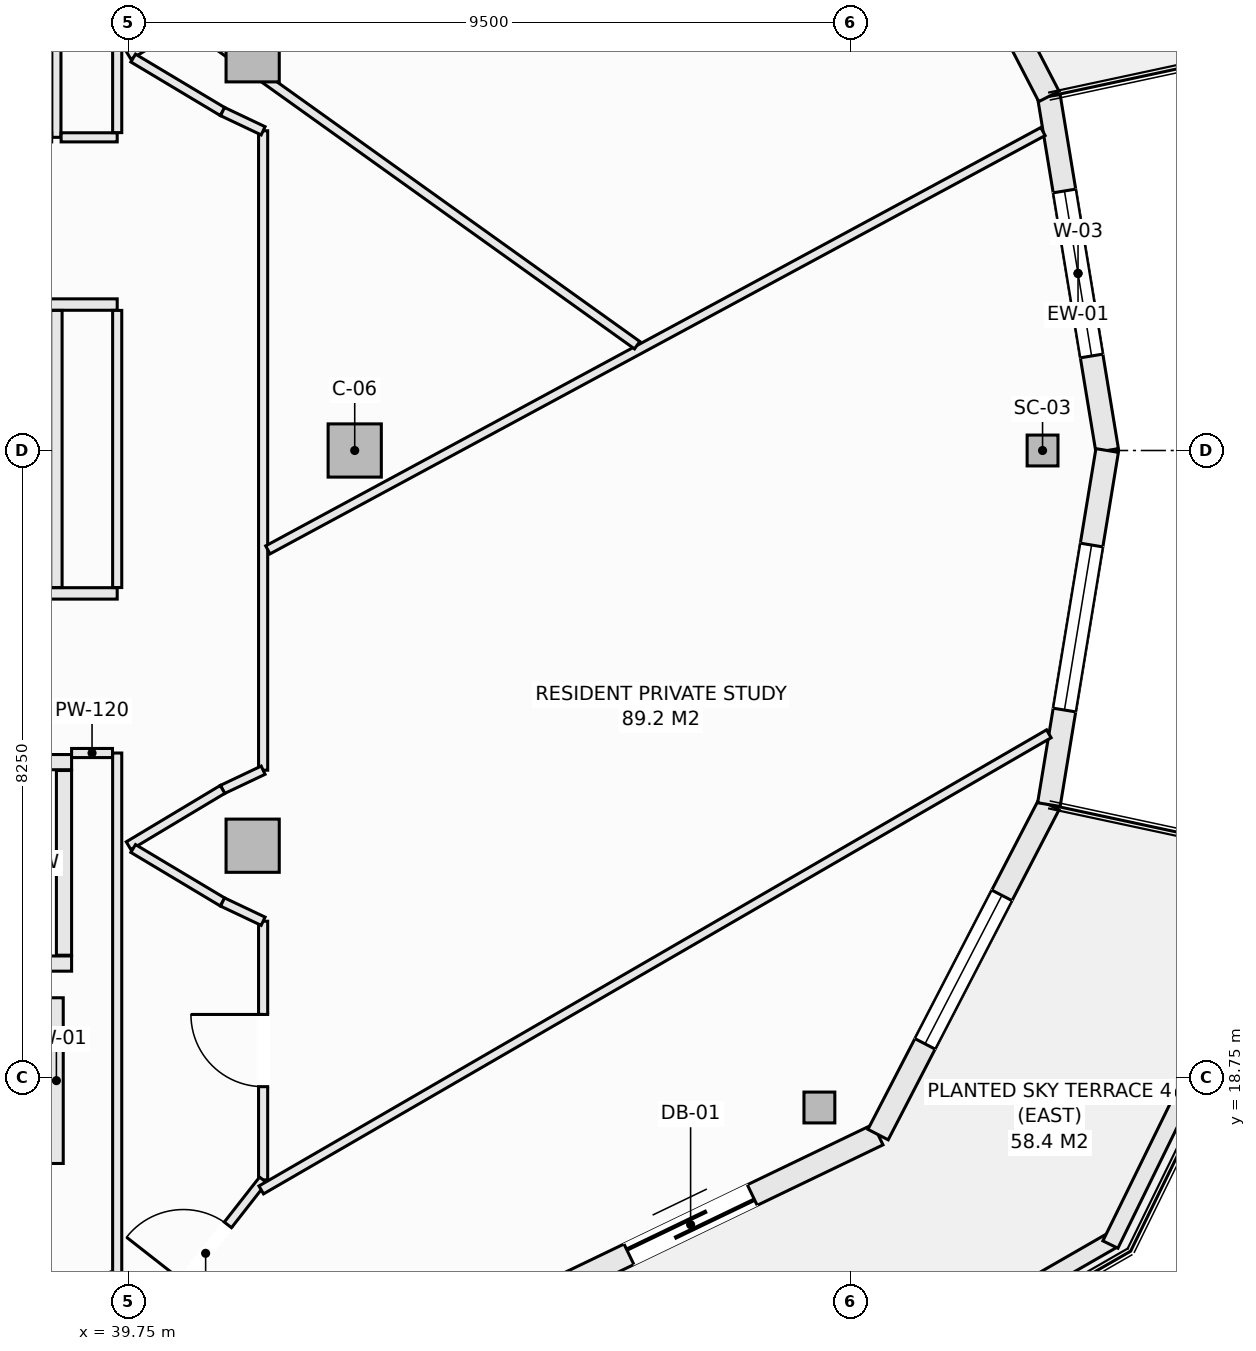
"""IFC4 building model, lengths in metres.
Left out: names, types, materials, properties, quantities, classifications, styles, units other than length and angle.
Written with IfcOpenShell. Run it as: python <this file> out.ifc"""

import sys

from ifc_helpers import new_model, si_unit, direction, frame, frame_2d, origin, origin_2d, place, context, subcontext, project, spatial, rectangle, hollow_rectangle, extrude, element, fill, save


model = new_model("IFC4")
c1 = context("Model", 3, precision=1e-05, world=origin(), true_north=direction((0.0, 1.0)))
c2 = subcontext(c1, "Body", "Model", "MODEL_VIEW")
j1 = project(units=[si_unit("LENGTHUNIT", "METRE"), si_unit("PLANEANGLEUNIT", "RADIAN")], contexts=[c1])
p1 = place(None, origin())
s1 = spatial("IfcSite", under=j1, at=p1, CompositionType="ELEMENT")
p2 = place(p1, origin())
s2 = spatial("IfcBuilding", under=s1, at=p2, CompositionType="ELEMENT")
p3 = place(p2, frame((0.0, 0.0, 252.5)))
s3 = spatial("IfcBuildingStorey", under=s2, at=p3, CompositionType="ELEMENT", Elevation=252.5)
for number, where, z_axis, x_axis in (
    (1, (51.775, 27.0, -0.27), (0.0, 0.0, 1.0), (1.0, 0.0, 0.0)),
    (2, (48.839, 18.356, -0.27), (0.0, 0.0, 1.0), (1.0, 0.0, 0.0)),
):
    element("IfcColumn", number, at=place(p3, frame(where, z_axis=z_axis, x_axis=x_axis)), inside=s3, PredefinedType="COLUMN", context=c2, shape_type="SweptSolid", body=[
        extrude(hollow_rectangle(XDim=0.406, YDim=0.406, WallThickness=0.016, at=origin_2d()), origin(), (0.0, 0.0, 1.0), 3.3),
    ])
for number, where, z_axis, x_axis in (
    (3, (42.725, 27.0, -0.27), (0.0, 0.0, 1.0), (1.0, 0.0, 0.0)),
    (4, (41.382, 32.199, -0.27), (0.0, 0.0, 1.0), (1.0, 0.0, 0.0)),
    (5, (41.382, 21.801, -0.27), (0.0, 0.0, 1.0), (1.0, 0.0, 0.0)),
):
    element("IfcColumn", number, at=place(p3, frame(where, z_axis=z_axis, x_axis=x_axis)), inside=s3, PredefinedType="COLUMN", context=c2, shape_type="SweptSolid", body=[
        extrude(rectangle(XDim=0.7, YDim=0.7, at=origin_2d()), origin(), (0.0, 0.0, 1.0), 3.3),
    ])
p4 = place(p3, frame((51.858, 31.659, 0.0), z_axis=(0.0, 0.0, 1.0), x_axis=(0.162369371657, -0.986730047758, 0.0)))
e6 = element("IfcWall", 6, at=p4, inside=s3, PredefinedType="SOLIDWALL", context=c2, shape_type="SweptSolid", body=[
    extrude(rectangle(XDim=4.721, YDim=0.3, at=frame_2d((2.361, 0.0))), origin(), (0.0, 0.0, 1.0), 2.605),
])
p5 = place(p4, frame((1.261, 0.0, 0.72)))
e7 = element("IfcOpeningElement", 7, at=p5, cuts=e6, PredefinedType="OPENING", context=c2, shape_type="SweptSolid", body=[
    extrude(rectangle(XDim=2.2, YDim=1.65, at=frame_2d((1.1, 0.825))), frame((0.0, 0.16, 0.0), z_axis=(0.0, -1.0, 0.0), x_axis=(1.0, 0.0, 0.0)), (0.0, 0.0, 1.0), 0.32),
])
p6 = place(p3, frame((49.611, 36.0, 0.0), z_axis=(0.0, 0.0, 1.0), x_axis=(0.459793771602, -0.888025724625, 0.0)))
e8 = element("IfcWall", 8, at=p6, inside=s3, PredefinedType="SOLIDWALL", context=c2, shape_type="SweptSolid", body=[
    extrude(rectangle(XDim=4.889, YDim=0.3, at=frame_2d((2.444, 0.0))), origin(), (0.0, 0.0, 1.0), 2.605),
])
p7 = place(p6, frame((1.344, 0.0, 0.72)))
e9 = element("IfcOpeningElement", 9, at=p7, cuts=e8, PredefinedType="OPENING", context=c2, shape_type="SweptSolid", body=[
    extrude(rectangle(XDim=2.2, YDim=1.65, at=frame_2d((1.1, 0.825))), frame((0.0, 0.16, 0.0), z_axis=(0.0, -1.0, 0.0), x_axis=(1.0, 0.0, 0.0)), (0.0, 0.0, 1.0), 0.32),
])
p8 = place(p3, frame((44.677, 15.63, 0.0), z_axis=(0.0, 0.0, 1.0), x_axis=(0.901355238351, 0.433080517106, 0.0)))
e10 = element("IfcWall", 10, at=p8, inside=s3, PredefinedType="SOLIDWALL", context=c2, shape_type="SweptSolid", body=[
    extrude(rectangle(XDim=5.473, YDim=0.3, at=frame_2d((2.737, 0.0))), origin(), (0.0, 0.0, 1.0), 2.605),
])
p9 = place(p8, frame((1.837, 0.0, 0.0)))
e11 = element("IfcOpeningElement", 11, at=p9, cuts=e10, PredefinedType="OPENING", context=c2, shape_type="SweptSolid", body=[
    extrude(rectangle(XDim=1.8, YDim=2.25, at=frame_2d((0.9, 1.125))), frame((0.0, 0.16, 0.0), z_axis=(0.0, -1.0, 0.0), x_axis=(1.0, 0.0, 0.0)), (0.0, 0.0, 1.0), 0.32),
])
p10 = place(p3, frame((49.611, 18.0, 0.0), z_axis=(0.0, 0.0, 1.0), x_axis=(0.459793771602, 0.888025724625, 0.0)))
e12 = element("IfcWall", 12, at=p10, inside=s3, PredefinedType="SOLIDWALL", context=c2, shape_type="SweptSolid", body=[
    extrude(rectangle(XDim=4.889, YDim=0.3, at=frame_2d((2.444, 0.0))), origin(), (0.0, 0.0, 1.0), 2.605),
])
p11 = place(p10, frame((1.344, 0.0, 0.72)))
e13 = element("IfcOpeningElement", 13, at=p11, cuts=e12, PredefinedType="OPENING", context=c2, shape_type="SweptSolid", body=[
    extrude(rectangle(XDim=2.2, YDim=1.65, at=frame_2d((1.1, 0.825))), frame((0.0, 0.16, 0.0), z_axis=(0.0, -1.0, 0.0), x_axis=(1.0, 0.0, 0.0)), (0.0, 0.0, 1.0), 0.32),
])
p12 = place(p3, frame((51.858, 22.341, 0.0), z_axis=(0.0, 0.0, 1.0), x_axis=(0.162369371657, 0.986730047758, 0.0)))
e14 = element("IfcWall", 14, at=p12, inside=s3, PredefinedType="SOLIDWALL", context=c2, shape_type="SweptSolid", body=[
    extrude(rectangle(XDim=4.721, YDim=0.3, at=frame_2d((2.361, 0.0))), origin(), (0.0, 0.0, 1.0), 2.605),
])
p13 = place(p12, frame((1.261, 0.0, 0.72)))
e15 = element("IfcOpeningElement", 15, at=p13, cuts=e14, PredefinedType="OPENING", context=c2, shape_type="SweptSolid", body=[
    extrude(rectangle(XDim=2.2, YDim=1.65, at=frame_2d((1.1, 0.825))), frame((0.0, 0.16, 0.0), z_axis=(0.0, -1.0, 0.0), x_axis=(1.0, 0.0, 0.0)), (0.0, 0.0, 1.0), 0.32),
])
p14 = place(p3, frame((47.321, 13.521, 0.0), z_axis=(0.0, 0.0, 1.0), x_axis=(0.866901621005, 0.49847926687, 0.0)))
e16 = element("IfcWall", 16, at=p14, inside=s3, PredefinedType="PARAPET", context=c2, shape_type="SweptSolid", body=[
    extrude(rectangle(XDim=6.197, YDim=0.22, at=frame_2d((3.098, 0.0))), origin(), (0.0, 0.0, 1.0), 0.52),
])
p15 = place(p3, frame((52.667, 16.553, 0.0), z_axis=(0.0, 0.0, 1.0), x_axis=(0.440058847499, 0.897968936399, 0.0)))
e17 = element("IfcWall", 17, at=p15, inside=s3, PredefinedType="PARAPET", context=c2, shape_type="SweptSolid", body=[
    extrude(rectangle(XDim=5.689, YDim=0.22, at=frame_2d((2.845, 0.0))), origin(), (0.0, 0.0, 1.0), 0.52),
])
p16 = place(p3, frame((36.75, 22.9, 0.0), z_axis=(0.0, 0.0, 1.0), x_axis=(1.0, 0.0, 0.0)))
e18 = element("IfcWall", 18, at=p16, inside=s3, PredefinedType="SOLIDWALL", context=c2, shape_type="SweptSolid", body=[
    extrude(rectangle(XDim=2.25, YDim=0.2, at=frame_2d((1.125, 0.0))), origin(), (0.0, 0.0, 1.0), 3.03),
])
p17 = place(p16, frame((0.575, 0.0, 0.0)))
e19 = element("IfcOpeningElement", 19, at=p17, cuts=e18, PredefinedType="OPENING", context=c2, shape_type="SweptSolid", body=[
    extrude(rectangle(XDim=1.1, YDim=2.2, at=frame_2d((0.55, 1.1))), frame((0.0, 0.11, 0.0), z_axis=(0.0, -1.0, 0.0), x_axis=(1.0, 0.0, 0.0)), (0.0, 0.0, 1.0), 0.22),
])
p18 = place(p3, frame((36.75, 20.25, 0.0), z_axis=(0.0, 0.0, 1.0), x_axis=(1.0, 0.0, 0.0)))
e20 = element("IfcWall", 20, at=p18, inside=s3, PredefinedType="SOLIDWALL", context=c2, shape_type="SweptSolid", body=[
    extrude(rectangle(XDim=2.25, YDim=0.2, at=frame_2d((1.125, 0.0))), origin(), (0.0, 0.0, 1.0), 3.03),
])
p19 = place(p3, frame((38.9, 20.36, 0.0), z_axis=(0.0, 0.0, 1.0), x_axis=(0.0, 1.0, 0.0)))
e21 = element("IfcWall", 21, at=p19, inside=s3, PredefinedType="SOLIDWALL", context=c2, shape_type="SweptSolid", body=[
    extrude(rectangle(XDim=2.43, YDim=0.2, at=frame_2d((1.215, 0.0))), origin(), (0.0, 0.0, 1.0), 3.03),
])
p20 = place(p3, frame((29.96, 25.12, 0.0), z_axis=(0.0, 0.0, 1.0), x_axis=(1.0, 0.0, 0.0)))
e22 = element("IfcWall", 22, at=p20, inside=s3, PredefinedType="PARTITIONING", context=c2, shape_type="SweptSolid", body=[
    extrude(rectangle(XDim=9.64, YDim=0.15, at=frame_2d((4.82, 0.0))), origin(), (0.0, 0.0, 1.0), 3.03),
])
p21 = place(p20, frame((3.05, 0.0, 0.0)))
e23 = element("IfcOpeningElement", 23, at=p21, cuts=e22, PredefinedType="OPENING", context=c2, shape_type="SweptSolid", body=[
    extrude(rectangle(XDim=0.95, YDim=2.1, at=frame_2d((0.475, 1.05))), frame((0.0, 0.085, 0.0), z_axis=(0.0, -1.0, 0.0), x_axis=(1.0, 0.0, 0.0)), (0.0, 0.0, 1.0), 0.17),
])
p22 = place(p20, frame((7.265, 0.0, 0.0)))
e24 = element("IfcOpeningElement", 24, at=p22, cuts=e22, PredefinedType="OPENING", context=c2, shape_type="SweptSolid", body=[
    extrude(rectangle(XDim=0.95, YDim=2.1, at=frame_2d((0.475, 1.05))), frame((0.0, 0.085, 0.0), z_axis=(0.0, -1.0, 0.0), x_axis=(1.0, 0.0, 0.0)), (0.0, 0.0, 1.0), 0.17),
])
p23 = place(p3, frame((30.077, 28.92, 0.0), z_axis=(0.0, 0.0, 1.0), x_axis=(1.0, 0.0, 0.0)))
e25 = element("IfcWall", 25, at=p23, inside=s3, PredefinedType="PARTITIONING", context=c2, shape_type="SweptSolid", body=[
    extrude(rectangle(XDim=9.523, YDim=0.15, at=frame_2d((4.762, 0.0))), origin(), (0.0, 0.0, 1.0), 3.03),
])
p24 = place(p3, frame((38.8, 17.62, 0.0), z_axis=(0.0, 0.0, 1.0), x_axis=(0.0, 1.0, 0.0)))
e26 = element("IfcWall", 26, at=p24, inside=s3, PredefinedType="SOLIDWALL", context=c2, shape_type="SweptSolid", body=[
    extrude(rectangle(XDim=2.18, YDim=0.18, at=frame_2d((1.09, 0.0))), origin(), (0.0, 0.0, 1.0), 3.03),
])
p25 = place(p3, frame((38.8, 25.197, 0.0), z_axis=(0.0, 0.0, 1.0), x_axis=(0.0, 1.0, 0.0)))
e27 = element("IfcWall", 27, at=p25, inside=s3, PredefinedType="PARTITIONING", context=c2, shape_type="SweptSolid", body=[
    extrude(rectangle(XDim=3.646, YDim=0.15, at=frame_2d((1.823, 0.0))), origin(), (0.0, 0.0, 1.0), 3.03),
])
p26 = place(p3, frame((38.8, 31.12, 0.0), z_axis=(0.0, 0.0, 1.0), x_axis=(0.0, 1.0, 0.0)))
e28 = element("IfcWall", 28, at=p26, inside=s3, PredefinedType="PARTITIONING", context=c2, shape_type="SweptSolid", body=[
    extrude(rectangle(XDim=2.63, YDim=0.12, at=frame_2d((1.315, 0.0))), origin(), (0.0, 0.0, 1.0), 3.03),
])
p27 = place(p3, frame((38.862, 31.12, 0.0), z_axis=(0.0, 0.0, 1.0), x_axis=(1.0, 0.0, 0.0)))
e29 = element("IfcWall", 29, at=p27, inside=s3, PredefinedType="PARTITIONING", context=c2, shape_type="SweptSolid", body=[
    extrude(rectangle(XDim=0.738, YDim=0.12, at=frame_2d((0.369, 0.0))), origin(), (0.0, 0.0, 1.0), 3.03),
])
p28 = place(p3, frame((39.6, 14.952, 0.0), z_axis=(0.0, 0.0, 1.0), x_axis=(0.0, 1.0, 0.0)))
e30 = element("IfcWall", 30, at=p28, inside=s3, PredefinedType="PARTITIONING", context=c2, shape_type="SweptSolid", body=[
    extrude(rectangle(XDim=8.068, YDim=0.12, at=frame_2d((4.034, 0.0))), origin(), (0.0, 0.0, 1.0), 2.478),
])
p29 = place(p3, frame((39.6, 25.197, 0.0), z_axis=(0.0, 0.0, 1.0), x_axis=(0.0, 1.0, 0.0)))
e31 = element("IfcWall", 31, at=p29, inside=s3, PredefinedType="PARTITIONING", context=c2, shape_type="SweptSolid", body=[
    extrude(rectangle(XDim=3.646, YDim=0.12, at=frame_2d((1.823, 0.0))), origin(), (0.0, 0.0, 1.0), 3.03),
])
p30 = place(p3, frame((39.6, 31.182, 0.0), z_axis=(0.0, 0.0, 1.0), x_axis=(0.0, 1.0, 0.0)))
e32 = element("IfcWall", 32, at=p30, inside=s3, PredefinedType="PARTITIONING", context=c2, shape_type="SweptSolid", body=[
    extrude(rectangle(XDim=7.866, YDim=0.12, at=frame_2d((3.933, 0.0))), origin(), (0.0, 0.0, 1.0), 3.03),
])
p31 = place(p3, frame((41.52, 17.404, 0.0), z_axis=(0.0, 0.0, 1.0), x_axis=(0.0, 1.0, 0.0)))
e33 = element("IfcWall", 33, at=p31, inside=s3, PredefinedType="PARTITIONING", context=c2, shape_type="SweptSolid", body=[
    extrude(rectangle(XDim=3.403, YDim=0.12, at=frame_2d((1.701, 0.0))), origin(), (0.0, 0.0, 1.0), 3.03),
])
p32 = place(p31, frame((1.227, 0.0, 0.0)))
e34 = element("IfcOpeningElement", 34, at=p32, cuts=e33, PredefinedType="OPENING", context=c2, shape_type="SweptSolid", body=[
    extrude(rectangle(XDim=0.95, YDim=2.1, at=frame_2d((0.475, 1.05))), frame((0.0, 0.07, 0.0), z_axis=(0.0, -1.0, 0.0), x_axis=(1.0, 0.0, 0.0)), (0.0, 0.0, 1.0), 0.14),
])
p33 = place(p3, frame((41.52, 22.794, 0.0), z_axis=(0.0, 0.0, 1.0), x_axis=(0.0, 1.0, 0.0)))
e35 = element("IfcWall", 35, at=p33, inside=s3, PredefinedType="PARTITIONING", context=c2, shape_type="SweptSolid", body=[
    extrude(rectangle(XDim=8.412, YDim=0.12, at=frame_2d((4.206, 0.0))), origin(), (0.0, 0.0, 1.0), 2.478),
])
p34 = place(p3, frame((39.75, 32.199, 0.0), z_axis=(0.0, 0.0, 1.0), x_axis=(0.857702120906, 0.514146935996, 0.0)))
e36 = element("IfcWall", 36, at=p34, inside=s3, PredefinedType="PARTITIONING", context=c2, shape_type="SweptSolid", body=[
    extrude(rectangle(XDim=1.441, YDim=0.12, at=frame_2d((0.721, 0.0))), origin(), (0.0, 0.0, 1.0), 3.03),
])
p35 = place(p3, frame((39.81, 32.163, 0.0), z_axis=(0.0, 0.0, 1.0), x_axis=(0.858011245414, -0.513630901273, 0.0)))
e37 = element("IfcWall", 37, at=p35, inside=s3, PredefinedType="PARTITIONING", context=c2, shape_type="SweptSolid", body=[
    extrude(rectangle(XDim=1.37, YDim=0.12, at=frame_2d((0.685, 0.0))), origin(), (0.0, 0.0, 1.0), 3.03),
])
for number, where, z_axis, x_axis in (
    (38, (40.986, 31.459, 0.0), (0.0, 0.0, 1.0), (0.904, -0.428, 0.0)),
    (39, (40.986, 22.541, 0.0), (0.0, 0.0, 1.0), (0.904, 0.428, 0.0)),
):
    element("IfcWall", number, at=place(p3, frame(where, z_axis=z_axis, x_axis=x_axis)), inside=s3, PredefinedType="PARTITIONING", context=c2, shape_type="SweptSolid", body=[
        extrude(rectangle(XDim=0.591, YDim=0.12, at=frame_2d((0.295, 0.0))), origin(), (0.0, 0.0, 1.0), 3.03),
    ])
p36 = place(p3, frame((39.75, 21.8, 0.0), z_axis=(0.0, 0.0, 1.0), x_axis=(0.857702120906, 0.514146935996, 0.0)))
e40 = element("IfcWall", 40, at=p36, inside=s3, PredefinedType="PARTITIONING", context=c2, shape_type="SweptSolid", body=[
    extrude(rectangle(XDim=1.441, YDim=0.12, at=frame_2d((0.721, 0.0))), origin(), (0.0, 0.0, 1.0), 3.03),
])
p37 = place(p3, frame((39.81, 21.764, 0.0), z_axis=(0.0, 0.0, 1.0), x_axis=(0.858011245414, -0.513630901273, 0.0)))
e41 = element("IfcWall", 41, at=p37, inside=s3, PredefinedType="PARTITIONING", context=c2, shape_type="SweptSolid", body=[
    extrude(rectangle(XDim=1.37, YDim=0.12, at=frame_2d((0.685, 0.0))), origin(), (0.0, 0.0, 1.0), 3.03),
])
p38 = place(p3, frame((40.986, 21.06, 0.0), z_axis=(0.0, 0.0, 1.0), x_axis=(0.90356951601, -0.428441512621, 0.0)))
e42 = element("IfcWall", 42, at=p38, inside=s3, PredefinedType="PARTITIONING", context=c2, shape_type="SweptSolid", body=[
    extrude(rectangle(XDim=0.591, YDim=0.12, at=frame_2d((0.295, 0.0))), origin(), (0.0, 0.0, 1.0), 3.03),
])
p39 = place(p3, frame((39.662, 15.031, 0.0), z_axis=(0.0, 0.0, 1.0), x_axis=(0.616500468458, 0.787354540465, 0.0)))
e43 = element("IfcWall", 43, at=p39, inside=s3, PredefinedType="PARTITIONING", context=c2, shape_type="SweptSolid", body=[
    extrude(rectangle(XDim=3.014, YDim=0.12, at=frame_2d((1.507, 0.0))), origin(), (0.0, 0.0, 1.0), 3.03),
])
p40 = place(p39, frame((1.312, 0.0, 0.0)))
e44 = element("IfcOpeningElement", 44, at=p40, cuts=e43, PredefinedType="OPENING", context=c2, shape_type="SweptSolid", body=[
    extrude(rectangle(XDim=0.95, YDim=2.1, at=frame_2d((0.475, 1.05))), frame((0.0, 0.07, 0.0), z_axis=(0.0, -1.0, 0.0), x_axis=(1.0, 0.0, 0.0)), (0.0, 0.0, 1.0), 0.14),
])
p41 = place(p3, frame((39.0, 23.02, 0.0), z_axis=(0.0, 0.0, 1.0), x_axis=(1.0, 0.0, 0.0)))
e45 = element("IfcWall", 45, at=p41, inside=s3, PredefinedType="PARTITIONING", context=c2, shape_type="SweptSolid", body=[
    extrude(rectangle(XDim=0.538, YDim=0.12, at=frame_2d((0.269, 0.0))), origin(), (0.0, 0.0, 1.0), 3.03),
])
p42 = place(p3, frame((41.582, 25.693, 0.0), z_axis=(0.0, 0.0, 1.0), x_axis=(0.880032375067, 0.474913696195, 0.0)))
e46 = element("IfcWall", 46, at=p42, inside=s3, PredefinedType="PARTITIONING", context=c2, shape_type="SweptSolid", body=[
    extrude(rectangle(XDim=11.589, YDim=0.12, at=frame_2d((5.794, 0.0))), origin(), (0.0, 0.0, 1.0), 2.478),
])
p43 = place(p3, frame((41.495, 17.272, 0.0), z_axis=(0.0, 0.0, 1.0), x_axis=(0.865359277242, 0.501151994201, 0.0)))
e47 = element("IfcWall", 47, at=p43, inside=s3, PredefinedType="PARTITIONING", context=c2, shape_type="SweptSolid", body=[
    extrude(rectangle(XDim=11.975, YDim=0.12, at=frame_2d((5.987, 0.0))), origin(), (0.0, 0.0, 1.0), 3.03),
])
p44 = place(p3, frame((40.546, 32.604, 0.0), z_axis=(0.0, 0.0, 1.0), x_axis=(0.813264440548, -0.581894277116, 0.0)))
e48 = element("IfcWall", 48, at=p44, inside=s3, PredefinedType="PARTITIONING", context=c2, shape_type="SweptSolid", body=[
    extrude(rectangle(XDim=7.249, YDim=0.12, at=frame_2d((3.625, 0.0))), origin(), (0.0, 0.0, 1.0), 3.03),
])
p45 = place(p5, origin())
e49 = element("IfcWindow", 49, at=p45, inside=s3, PartitioningType="SINGLE_PANEL", PredefinedType="WINDOW", context=c2, shape_type="SweptSolid", body=[
    extrude(rectangle(XDim=2.2, YDim=1.65, at=frame_2d((1.1, 0.825))), frame((0.0, 0.03, 0.0), z_axis=(0.0, -1.0, 0.0), x_axis=(1.0, 0.0, 0.0)), (0.0, 0.0, 1.0), 0.06),
])
fill(e7, e49)
p46 = place(p9, frame((1.8, 0.0, 0.0), z_axis=(0.0, 0.0, 1.0), x_axis=(-1.0, 0.0, 0.0)))
e50 = element("IfcDoor", 50, at=p46, inside=s3, OperationType="SLIDING_TO_LEFT", PredefinedType="DOOR", context=c2, shape_type="SweptSolid", body=[
    extrude(rectangle(XDim=1.8, YDim=2.25, at=frame_2d((0.9, 1.125))), frame((0.0, 0.025, 0.0), z_axis=(0.0, -1.0, 0.0), x_axis=(1.0, 0.0, 0.0)), (0.0, 0.0, 1.0), 0.05),
])
fill(e11, e50)
p47 = place(p11, origin())
e51 = element("IfcWindow", 51, at=p47, inside=s3, PartitioningType="SINGLE_PANEL", PredefinedType="WINDOW", context=c2, shape_type="SweptSolid", body=[
    extrude(rectangle(XDim=2.2, YDim=1.65, at=frame_2d((1.1, 0.825))), frame((0.0, 0.03, 0.0), z_axis=(0.0, -1.0, 0.0), x_axis=(1.0, 0.0, 0.0)), (0.0, 0.0, 1.0), 0.06),
])
fill(e13, e51)
p48 = place(p13, origin())
e52 = element("IfcWindow", 52, at=p48, inside=s3, PartitioningType="SINGLE_PANEL", PredefinedType="WINDOW", context=c2, shape_type="SweptSolid", body=[
    extrude(rectangle(XDim=2.2, YDim=1.65, at=frame_2d((1.1, 0.825))), frame((0.0, 0.03, 0.0), z_axis=(0.0, -1.0, 0.0), x_axis=(1.0, 0.0, 0.0)), (0.0, 0.0, 1.0), 0.06),
])
fill(e15, e52)
p49 = place(p40, origin())
e53 = element("IfcDoor", 53, at=p49, inside=s3, OperationType="SINGLE_SWING_LEFT", PredefinedType="DOOR", context=c2, shape_type="SweptSolid", body=[
    extrude(rectangle(XDim=0.95, YDim=2.1, at=frame_2d((0.475, 1.05))), frame((0.0, 0.025, 0.0), z_axis=(0.0, -1.0, 0.0), x_axis=(1.0, 0.0, 0.0)), (0.0, 0.0, 1.0), 0.05),
])
fill(e44, e53)
p50 = place(p32, origin())
e54 = element("IfcDoor", 54, at=p50, inside=s3, OperationType="SINGLE_SWING_RIGHT", PredefinedType="DOOR", context=c2, shape_type="SweptSolid", body=[
    extrude(rectangle(XDim=0.95, YDim=2.1, at=frame_2d((0.475, 1.05))), frame((0.0, 0.025, 0.0), z_axis=(0.0, -1.0, 0.0), x_axis=(1.0, 0.0, 0.0)), (0.0, 0.0, 1.0), 0.05),
])
fill(e34, e54)
save(model, sys.argv[1])
